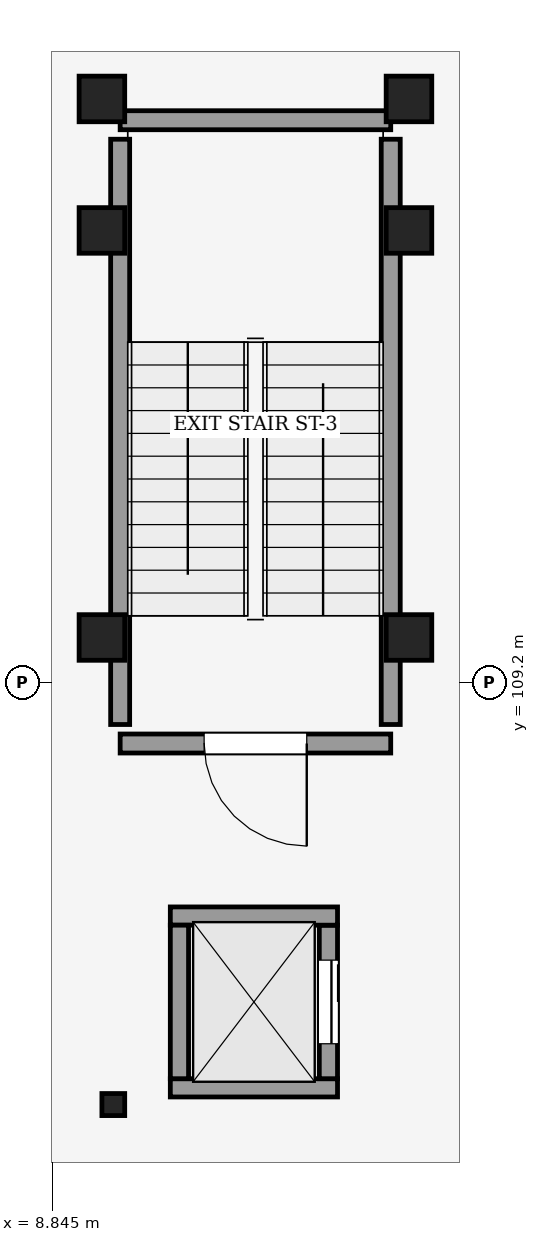
"""IFC4 building model, lengths in metres.
Left out: names, types, materials, properties, quantities, classifications, styles, units other than length and angle.
Written with IfcOpenShell. Run it as: python <this file> out.ifc"""

import sys

from ifc_helpers import new_model, si_unit, direction, frame, frame_2d, origin, origin_2d, place, context, subcontext, project, spatial, rectangle, i_section, extrude, element, fill, save


model = new_model("IFC4")
c1 = context("Model", 3, precision=1e-05, world=origin(), true_north=direction((0.0, 1.0)))
c2 = subcontext(c1, "Body", "Model", "MODEL_VIEW")
j1 = project(units=[si_unit("LENGTHUNIT", "METRE"), si_unit("PLANEANGLEUNIT", "RADIAN")], contexts=[c1])
p1 = place(None, origin())
s1 = spatial("IfcSite", under=j1, at=p1, CompositionType="ELEMENT")
p2 = place(p1, origin())
s2 = spatial("IfcBuilding", under=s1, at=p2, CompositionType="ELEMENT")
p3 = place(p2, frame((0.0, 0.0, -4.2)))
s3 = spatial("IfcBuildingStorey", under=s2, at=p3, CompositionType="ELEMENT", Elevation=-4.2)
for number, where, z_axis, x_axis in (
    (1, (13.54, 109.795, 0.0), (0.0, 0.0, 1.0), (1.0, 0.0, 0.0)),
    (2, (9.5, 109.795, 0.0), (0.0, 0.0, 1.0), (1.0, 0.0, 0.0)),
    (3, (13.54, 115.15, 0.0), (0.0, 0.0, 1.0), (1.0, 0.0, 0.0)),
    (4, (9.5, 115.15, 0.0), (0.0, 0.0, 1.0), (1.0, 0.0, 0.0)),
    (5, (13.54, 116.88, 0.0), (0.0, 0.0, 1.0), (1.0, 0.0, 0.0)),
    (6, (9.5, 116.88, 0.0), (0.0, 0.0, 1.0), (1.0, 0.0, 0.0)),
):
    element("IfcColumn", number, at=place(p3, frame(where, z_axis=z_axis, x_axis=x_axis)), inside=s3, PredefinedType="COLUMN", context=c2, shape_type="SweptSolid", body=[
        extrude(rectangle(XDim=0.6, YDim=0.6, at=origin_2d()), origin(), (0.0, 0.0, 1.0), 4.2),
    ])
p4 = place(p3, frame((9.65, 103.65, 0.0), z_axis=(0.0, 0.0, 1.0), x_axis=(1.0, 0.0, 0.0)))
e7 = element("IfcColumn", 7, at=p4, inside=s3, PredefinedType="COLUMN", context=c2, shape_type="SweptSolid", body=[
    extrude(i_section(OverallWidth=0.3, OverallDepth=0.29, WebThickness=0.009, FlangeThickness=0.014, at=origin_2d()), origin(), (0.0, 0.0, 1.0), 4.2),
])
p5 = place(p3, frame((13.3, 108.4, 0.0), z_axis=(0.0, 0.0, 1.0), x_axis=(-1.0, 0.0, 0.0)))
e8 = element("IfcWall", 8, at=p5, inside=s3, PredefinedType="SHEAR", context=c2, shape_type="SweptSolid", body=[
    extrude(rectangle(XDim=3.56, YDim=0.25, at=frame_2d((1.78, 0.0))), origin(), (0.0, 0.0, 1.0), 4.2),
])
p6 = place(p5, frame((1.105, 0.0, 0.0)))
e9 = element("IfcOpeningElement", 9, at=p6, cuts=e8, PredefinedType="OPENING", context=c2, shape_type="SweptSolid", body=[
    extrude(rectangle(XDim=1.35, YDim=2.2, at=frame_2d((0.675, 1.1))), frame((0.0, 0.135, 0.0), z_axis=(0.0, -1.0, 0.0), x_axis=(1.0, 0.0, 0.0)), (0.0, 0.0, 1.0), 0.27),
])
p7 = place(p3, frame((9.74, 108.65, 0.0), z_axis=(0.0, 0.0, 1.0), x_axis=(0.0, 1.0, 0.0)))
e10 = element("IfcWall", 10, at=p7, inside=s3, PredefinedType="SHEAR", context=c2, shape_type="SweptSolid", body=[
    extrude(rectangle(XDim=7.7, YDim=0.25, at=frame_2d((3.85, 0.0))), origin(), (0.0, 0.0, 1.0), 4.2),
])
p8 = place(p3, frame((9.74, 116.6, 0.0), z_axis=(0.0, 0.0, 1.0), x_axis=(1.0, 0.0, 0.0)))
e11 = element("IfcWall", 11, at=p8, inside=s3, PredefinedType="SHEAR", context=c2, shape_type="SweptSolid", body=[
    extrude(rectangle(XDim=3.56, YDim=0.25, at=frame_2d((1.78, 0.0))), origin(), (0.0, 0.0, 1.0), 4.2),
])
p9 = place(p3, frame((13.3, 116.35, 0.0), z_axis=(0.0, 0.0, 1.0), x_axis=(0.0, -1.0, 0.0)))
e12 = element("IfcWall", 12, at=p9, inside=s3, PredefinedType="SHEAR", context=c2, shape_type="SweptSolid", body=[
    extrude(rectangle(XDim=7.7, YDim=0.25, at=frame_2d((3.85, 0.0))), origin(), (0.0, 0.0, 1.0), 4.2),
])
p10 = place(p3, frame((12.6, 103.87, 0.0), z_axis=(0.0, 0.0, 1.0), x_axis=(-1.0, 0.0, 0.0)))
e13 = element("IfcWall", 13, at=p10, inside=s3, PredefinedType="SHEAR", context=c2, shape_type="SweptSolid", body=[
    extrude(rectangle(XDim=2.2, YDim=0.24, at=frame_2d((1.1, 0.0))), origin(), (0.0, 0.0, 1.0), 4.2),
])
p11 = place(p3, frame((12.48, 106.01, 0.0), z_axis=(0.0, 0.0, 1.0), x_axis=(0.0, -1.0, 0.0)))
e14 = element("IfcWall", 14, at=p11, inside=s3, PredefinedType="SHEAR", context=c2, shape_type="SweptSolid", body=[
    extrude(rectangle(XDim=2.02, YDim=0.24, at=frame_2d((1.01, 0.0))), origin(), (0.0, 0.0, 1.0), 4.2),
])
p12 = place(p11, frame((0.46, 0.0, 0.0)))
e15 = element("IfcOpeningElement", 15, at=p12, cuts=e14, PredefinedType="OPENING", context=c2, shape_type="SweptSolid", body=[
    extrude(rectangle(XDim=1.1, YDim=2.15, at=frame_2d((0.55, 1.075))), frame((0.0, 0.13, 0.0), z_axis=(0.0, -1.0, 0.0), x_axis=(1.0, 0.0, 0.0)), (0.0, 0.0, 1.0), 0.26),
])
p13 = place(p3, frame((10.4, 106.13, 0.0), z_axis=(0.0, 0.0, 1.0), x_axis=(1.0, 0.0, 0.0)))
e16 = element("IfcWall", 16, at=p13, inside=s3, PredefinedType="SHEAR", context=c2, shape_type="SweptSolid", body=[
    extrude(rectangle(XDim=2.2, YDim=0.24, at=frame_2d((1.1, 0.0))), origin(), (0.0, 0.0, 1.0), 4.2),
])
p14 = place(p3, frame((10.52, 103.99, 0.0), z_axis=(0.0, 0.0, 1.0), x_axis=(0.0, 1.0, 0.0)))
e17 = element("IfcWall", 17, at=p14, inside=s3, PredefinedType="SHEAR", context=c2, shape_type="SweptSolid", body=[
    extrude(rectangle(XDim=2.02, YDim=0.24, at=frame_2d((1.01, 0.0))), origin(), (0.0, 0.0, 1.0), 4.2),
])
p15 = place(p6, origin())
e18 = element("IfcDoor", 18, at=p15, inside=s3, OperationType="SINGLE_SWING_LEFT", PredefinedType="DOOR", context=c2, shape_type="SweptSolid", body=[
    extrude(rectangle(XDim=1.35, YDim=2.2, at=frame_2d((0.675, 1.1))), frame((0.0, 0.025, 0.0), z_axis=(0.0, -1.0, 0.0), x_axis=(1.0, 0.0, 0.0)), (0.0, 0.0, 1.0), 0.05),
])
fill(e9, e18)
p16 = place(p12, origin())
e19 = element("IfcDoor", 19, at=p16, inside=s3, OperationType="SLIDING_TO_LEFT", PredefinedType="DOOR", context=c2, shape_type="SweptSolid", body=[
    extrude(rectangle(XDim=1.1, YDim=2.15, at=frame_2d((0.55, 1.075))), frame((0.0, 0.025, 0.0), z_axis=(0.0, -1.0, 0.0), x_axis=(1.0, 0.0, 0.0)), (0.0, 0.0, 1.0), 0.05),
])
fill(e15, e19)
save(model, sys.argv[1])
